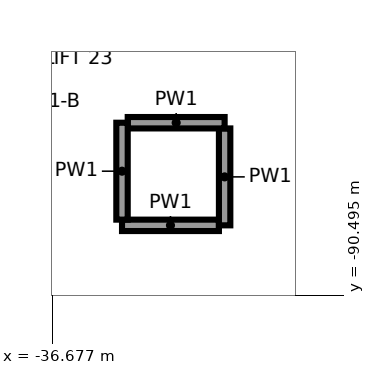
"""IFC4 building model, lengths in metres.
Left out: names, types, materials, properties, quantities, classifications, styles, units other than length and angle.
Written with IfcOpenShell. Run it as: python <this file> out.ifc"""

import sys

from ifc_helpers import new_model, si_unit, direction, frame, frame_2d, origin, origin_2d, place, context, subcontext, project, spatial, rectangle, circle, extrude, element, save


model = new_model("IFC4")
c1 = context("Model", 3, precision=1e-05, world=origin(), true_north=direction((0.0, 1.0)))
c2 = subcontext(c1, "Body", "Model", "MODEL_VIEW")
j1 = project(units=[si_unit("LENGTHUNIT", "METRE"), si_unit("PLANEANGLEUNIT", "RADIAN")], contexts=[c1])
p1 = place(None, origin())
s1 = spatial("IfcSite", under=j1, at=p1, CompositionType="ELEMENT")
p2 = place(p1, origin())
s2 = spatial("IfcBuilding", under=s1, at=p2, CompositionType="ELEMENT")
p3 = place(p2, frame((0.0, 0.0, 12.0)))
s3 = spatial("IfcBuildingStorey", under=s2, at=p3, CompositionType="ELEMENT", Elevation=12.0)
p4 = place(p3, frame((-32.944, -90.551, 0.0), z_axis=(0.0, 0.0, 1.0), x_axis=(1.0, 0.0, 0.0)))
e1 = element("IfcColumn", 1, at=p4, inside=s3, PredefinedType="COLUMN", context=c2, shape_type="SweptSolid", body=[
    extrude(circle(Radius=0.55, at=origin_2d()), origin(), (0.0, 0.0, 1.0), 6.0),
])
p5 = place(p3, frame((-35.758, -89.576, 0.0), z_axis=(0.0, 0.0, 1.0), x_axis=(1.0, 0.0, 0.0)))
e2 = element("IfcWall", 2, at=p5, inside=s3, PredefinedType="PARTITIONING", context=c2, shape_type="SweptSolid", body=[
    extrude(rectangle(XDim=1.275, YDim=0.15, at=frame_2d((0.637, 0.0))), origin(), (0.0, 0.0, 1.0), 5.65),
])
for number, where, z_axis, x_axis in (
    (3, (-34.408, -89.576, 0.0), (0.0, 0.0, 1.0), (0.0, 1.0, 0.0)),
    (4, (-34.408, -88.226, 0.0), (0.0, 0.0, 1.0), (-1.0, 0.0, 0.0)),
    (5, (-35.758, -88.226, 0.0), (0.0, 0.0, 1.0), (0.0, -1.0, 0.0)),
):
    element("IfcWall", number, at=place(p3, frame(where, z_axis=z_axis, x_axis=x_axis)), inside=s3, PredefinedType="PARTITIONING", context=c2, shape_type="SweptSolid", body=[
        extrude(rectangle(XDim=1.275, YDim=0.15, at=frame_2d((0.638, 0.0))), origin(), (0.0, 0.0, 1.0), 5.65),
    ])
save(model, sys.argv[1])
